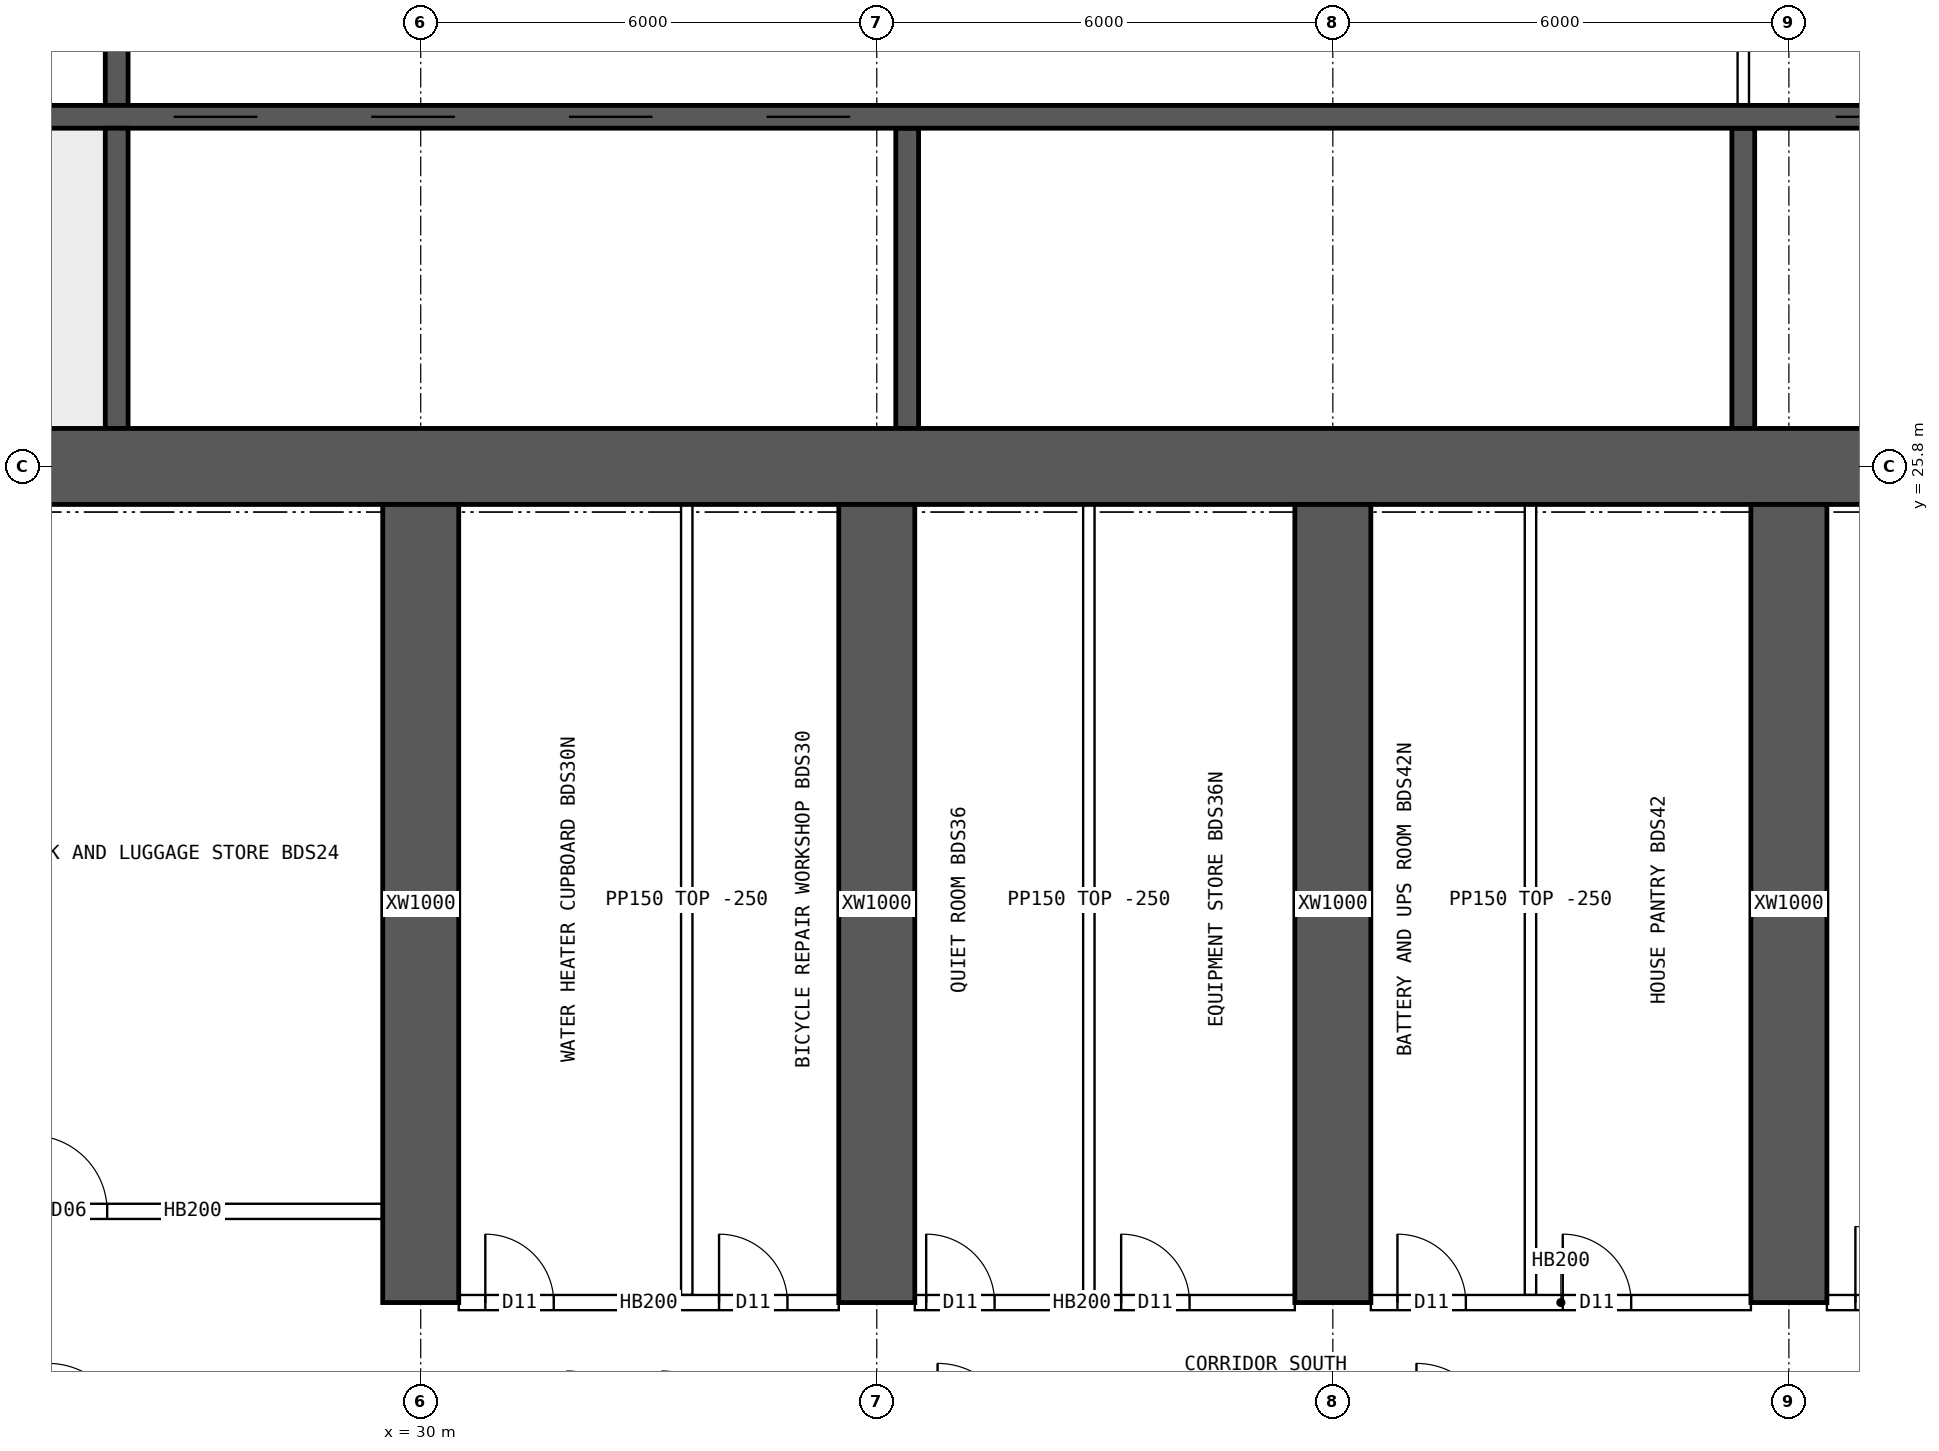
"""IFC4 building model, lengths in metres.
Left out: names, types, materials, properties, quantities, classifications, styles, units other than length and angle.
Written with IfcOpenShell. Run it as: python <this file> out.ifc"""

import sys

from ifc_helpers import new_model, si_unit, direction, frame, frame_2d, origin, place, context, subcontext, project, spatial, rectangle, extrude, element, fill, save


model = new_model("IFC4")
c1 = context("Model", 3, precision=1e-05, world=origin(), true_north=direction((0.0, 1.0)))
c2 = subcontext(c1, "Body", "Model", "MODEL_VIEW")
j1 = project(units=[si_unit("LENGTHUNIT", "METRE"), si_unit("PLANEANGLEUNIT", "RADIAN")], contexts=[c1])
p1 = place(None, origin())
s1 = spatial("IfcSite", under=j1, at=p1, CompositionType="ELEMENT")
p2 = place(p1, origin())
s2 = spatial("IfcBuilding", under=s1, at=p2, CompositionType="ELEMENT")
p3 = place(p2, frame((0.0, 0.0, 27.7)))
s3 = spatial("IfcBuildingStorey", under=s2, at=p3, CompositionType="ELEMENT", Elevation=27.7)
p4 = place(p3, frame((18.0, 25.8, 0.0), z_axis=(0.0, 0.0, 1.0), x_axis=(1.0, 0.0, 0.0)))
e1 = element("IfcWall", 1, at=p4, inside=s3, PredefinedType="SHEAR", context=c2, shape_type="SweptSolid", body=[
    extrude(rectangle(XDim=48.0, YDim=1.0, at=frame_2d((24.0, 0.0))), origin(), (0.0, 0.0, 1.0), 3.75),
])
p5 = place(p3, frame((18.5, 30.4, 0.0), z_axis=(0.0, 0.0, 1.0), x_axis=(1.0, 0.0, 0.0)))
e2 = element("IfcWall", 2, at=p5, inside=s3, PredefinedType="SHEAR", context=c2, shape_type="SweptSolid", body=[
    extrude(rectangle(XDim=47.0, YDim=0.3, at=frame_2d((23.5, 0.0))), origin(), (0.0, 0.0, 1.0), 3.75),
])
p6 = place(p5, frame((0.4, 0.0, 0.0)))
e3 = element("IfcOpeningElement", 3, at=p6, cuts=e2, PredefinedType="OPENING", context=c2, shape_type="SweptSolid", body=[
    extrude(rectangle(XDim=1.0, YDim=2.1, at=frame_2d((0.5, 1.05))), frame((0.0, 0.16, 0.0), z_axis=(0.0, -1.0, 0.0), x_axis=(1.0, 0.0, 0.0)), (0.0, 0.0, 1.0), 0.32),
])
p7 = place(p5, frame((45.6, 0.0, 0.0)))
e4 = element("IfcOpeningElement", 4, at=p7, cuts=e2, PredefinedType="OPENING", context=c2, shape_type="SweptSolid", body=[
    extrude(rectangle(XDim=1.0, YDim=2.1, at=frame_2d((0.5, 1.05))), frame((0.0, 0.16, 0.0), z_axis=(0.0, -1.0, 0.0), x_axis=(1.0, 0.0, 0.0)), (0.0, 0.0, 1.0), 0.32),
])
p8 = place(p5, frame((8.25, 0.0, 0.0)))
e5 = element("IfcOpeningElement", 5, at=p8, cuts=e2, PredefinedType="OPENING", context=c2, shape_type="SweptSolid", body=[
    extrude(rectangle(XDim=1.1, YDim=2.1, at=frame_2d((0.55, 1.05))), frame((0.0, 0.16, 0.0), z_axis=(0.0, -1.0, 0.0), x_axis=(1.0, 0.0, 0.0)), (0.0, 0.0, 1.0), 0.32),
])
p9 = place(p5, frame((10.85, 0.0, 0.0)))
e6 = element("IfcOpeningElement", 6, at=p9, cuts=e2, PredefinedType="OPENING", context=c2, shape_type="SweptSolid", body=[
    extrude(rectangle(XDim=1.1, YDim=2.1, at=frame_2d((0.55, 1.05))), frame((0.0, 0.16, 0.0), z_axis=(0.0, -1.0, 0.0), x_axis=(1.0, 0.0, 0.0)), (0.0, 0.0, 1.0), 0.32),
])
p10 = place(p5, frame((13.45, 0.0, 0.0)))
e7 = element("IfcOpeningElement", 7, at=p10, cuts=e2, PredefinedType="OPENING", context=c2, shape_type="SweptSolid", body=[
    extrude(rectangle(XDim=1.1, YDim=2.1, at=frame_2d((0.55, 1.05))), frame((0.0, 0.16, 0.0), z_axis=(0.0, -1.0, 0.0), x_axis=(1.0, 0.0, 0.0)), (0.0, 0.0, 1.0), 0.32),
])
p11 = place(p5, frame((16.05, 0.0, 0.0)))
e8 = element("IfcOpeningElement", 8, at=p11, cuts=e2, PredefinedType="OPENING", context=c2, shape_type="SweptSolid", body=[
    extrude(rectangle(XDim=1.1, YDim=2.1, at=frame_2d((0.55, 1.05))), frame((0.0, 0.16, 0.0), z_axis=(0.0, -1.0, 0.0), x_axis=(1.0, 0.0, 0.0)), (0.0, 0.0, 1.0), 0.32),
])
p12 = place(p5, frame((30.117, 0.0, 0.0)))
e9 = element("IfcOpeningElement", 9, at=p12, cuts=e2, PredefinedType="OPENING", context=c2, shape_type="SweptSolid", body=[
    extrude(rectangle(XDim=1.1, YDim=2.1, at=frame_2d((0.55, 1.05))), frame((0.0, 0.16, 0.0), z_axis=(0.0, -1.0, 0.0), x_axis=(1.0, 0.0, 0.0)), (0.0, 0.0, 1.0), 0.32),
])
p13 = place(p5, frame((33.65, 0.0, 0.0)))
e10 = element("IfcOpeningElement", 10, at=p13, cuts=e2, PredefinedType="OPENING", context=c2, shape_type="SweptSolid", body=[
    extrude(rectangle(XDim=1.1, YDim=2.1, at=frame_2d((0.55, 1.05))), frame((0.0, 0.16, 0.0), z_axis=(0.0, -1.0, 0.0), x_axis=(1.0, 0.0, 0.0)), (0.0, 0.0, 1.0), 0.32),
])
p14 = place(p5, frame((37.183, 0.0, 0.0)))
e11 = element("IfcOpeningElement", 11, at=p14, cuts=e2, PredefinedType="OPENING", context=c2, shape_type="SweptSolid", body=[
    extrude(rectangle(XDim=1.1, YDim=2.1, at=frame_2d((0.55, 1.05))), frame((0.0, 0.16, 0.0), z_axis=(0.0, -1.0, 0.0), x_axis=(1.0, 0.0, 0.0)), (0.0, 0.0, 1.0), 0.32),
])
p15 = place(p3, frame((26.0, 26.3, 0.0), z_axis=(0.0, 0.0, 1.0), x_axis=(0.0, 1.0, 0.0)))
e12 = element("IfcWall", 12, at=p15, inside=s3, PredefinedType="SHEAR", context=c2, shape_type="SweptSolid", body=[
    extrude(rectangle(XDim=3.95, YDim=0.3, at=frame_2d((1.975, 0.0))), origin(), (0.0, 0.0, 1.0), 3.75),
])
p16 = place(p3, frame((26.0, 30.55, 0.0), z_axis=(0.0, 0.0, 1.0), x_axis=(0.0, 1.0, 0.0)))
e13 = element("IfcWall", 13, at=p16, inside=s3, PredefinedType="SHEAR", context=c2, shape_type="SweptSolid", body=[
    extrude(rectangle(XDim=3.9, YDim=0.3, at=frame_2d((1.95, 0.0))), origin(), (0.0, 0.0, 1.0), 3.75),
])
p17 = place(p16, frame((1.4, 0.0, 0.0)))
e14 = element("IfcOpeningElement", 14, at=p17, cuts=e13, PredefinedType="OPENING", context=c2, shape_type="SweptSolid", body=[
    extrude(rectangle(XDim=1.2, YDim=2.1, at=frame_2d((0.6, 1.05))), frame((0.0, 0.16, 0.0), z_axis=(0.0, -1.0, 0.0), x_axis=(1.0, 0.0, 0.0)), (0.0, 0.0, 1.0), 0.32),
])
for number, where, z_axis, x_axis in (
    (15, (36.4, 26.3, 0.0), (0.0, 0.0, 1.0), (0.0, 1.0, 0.0)),
    (16, (47.4, 26.3, 0.0), (0.0, 0.0, 1.0), (0.0, 1.0, 0.0)),
):
    element("IfcWall", number, at=place(p3, frame(where, z_axis=z_axis, x_axis=x_axis)), inside=s3, PredefinedType="SHEAR", context=c2, shape_type="SweptSolid", body=[
        extrude(rectangle(XDim=3.95, YDim=0.3, at=frame_2d((1.975, 0.0))), origin(), (0.0, 0.0, 1.0), 3.75),
    ])
for number, where, z_axis, x_axis in (
    (17, (30.0, 14.8, 0.0), (0.0, 0.0, 1.0), (0.0, 1.0, 0.0)),
    (18, (36.0, 14.8, 0.0), (0.0, 0.0, 1.0), (0.0, 1.0, 0.0)),
    (19, (42.0, 14.8, 0.0), (0.0, 0.0, 1.0), (0.0, 1.0, 0.0)),
    (20, (48.0, 14.8, 0.0), (0.0, 0.0, 1.0), (0.0, 1.0, 0.0)),
):
    element("IfcWall", number, at=place(p3, frame(where, z_axis=z_axis, x_axis=x_axis)), inside=s3, PredefinedType="SHEAR", context=c2, shape_type="SweptSolid", body=[
        extrude(rectangle(XDim=10.5, YDim=1.0, at=frame_2d((5.25, 0.0))), origin(), (0.0, 0.0, 1.0), 3.75),
    ])
p18 = place(p3, frame((47.4, 30.55, 0.0), z_axis=(0.0, 0.0, 1.0), x_axis=(0.0, 1.0, 0.0)))
e21 = element("IfcWall", 21, at=p18, inside=s3, PredefinedType="SOLIDWALL", context=c2, shape_type="SweptSolid", body=[
    extrude(rectangle(XDim=3.9, YDim=0.15, at=frame_2d((1.95, 0.0))), origin(), (0.0, 0.0, 1.0), 3.5),
])
p19 = place(p18, frame((1.15, 0.0, 0.0)))
e22 = element("IfcOpeningElement", 22, at=p19, cuts=e21, PredefinedType="OPENING", context=c2, shape_type="SweptSolid", body=[
    extrude(rectangle(XDim=1.6, YDim=2.1, at=frame_2d((0.8, 1.05))), frame((0.0, 0.085, 0.0), z_axis=(0.0, -1.0, 0.0), x_axis=(1.0, 0.0, 0.0)), (0.0, 0.0, 1.0), 0.17),
])
p20 = place(p3, frame((30.5, 14.8, 0.0), z_axis=(0.0, 0.0, 1.0), x_axis=(1.0, 0.0, 0.0)))
e23 = element("IfcWall", 23, at=p20, inside=s3, PredefinedType="SOLIDWALL", context=c2, shape_type="SweptSolid", body=[
    extrude(rectangle(XDim=5.0, YDim=0.2, at=frame_2d((2.5, 0.0))), origin(), (0.0, 0.0, 1.0), 3.5),
])
p21 = place(p20, frame((0.35, 0.0, 0.0)))
e24 = element("IfcOpeningElement", 24, at=p21, cuts=e23, PredefinedType="OPENING", context=c2, shape_type="SweptSolid", body=[
    extrude(rectangle(XDim=0.9, YDim=2.1, at=frame_2d((0.45, 1.05))), frame((0.0, 0.11, 0.0), z_axis=(0.0, -1.0, 0.0), x_axis=(1.0, 0.0, 0.0)), (0.0, 0.0, 1.0), 0.22),
])
p22 = place(p20, frame((3.425, 0.0, 0.0)))
e25 = element("IfcOpeningElement", 25, at=p22, cuts=e23, PredefinedType="OPENING", context=c2, shape_type="SweptSolid", body=[
    extrude(rectangle(XDim=0.9, YDim=2.1, at=frame_2d((0.45, 1.05))), frame((0.0, 0.11, 0.0), z_axis=(0.0, -1.0, 0.0), x_axis=(1.0, 0.0, 0.0)), (0.0, 0.0, 1.0), 0.22),
])
p23 = place(p3, frame((36.5, 14.8, 0.0), z_axis=(0.0, 0.0, 1.0), x_axis=(1.0, 0.0, 0.0)))
e26 = element("IfcWall", 26, at=p23, inside=s3, PredefinedType="SOLIDWALL", context=c2, shape_type="SweptSolid", body=[
    extrude(rectangle(XDim=5.0, YDim=0.2, at=frame_2d((2.5, 0.0))), origin(), (0.0, 0.0, 1.0), 3.5),
])
p24 = place(p23, frame((0.15, 0.0, 0.0)))
e27 = element("IfcOpeningElement", 27, at=p24, cuts=e26, PredefinedType="OPENING", context=c2, shape_type="SweptSolid", body=[
    extrude(rectangle(XDim=0.9, YDim=2.1, at=frame_2d((0.45, 1.05))), frame((0.0, 0.11, 0.0), z_axis=(0.0, -1.0, 0.0), x_axis=(1.0, 0.0, 0.0)), (0.0, 0.0, 1.0), 0.22),
])
p25 = place(p23, frame((2.715, 0.0, 0.0)))
e28 = element("IfcOpeningElement", 28, at=p25, cuts=e26, PredefinedType="OPENING", context=c2, shape_type="SweptSolid", body=[
    extrude(rectangle(XDim=0.9, YDim=2.1, at=frame_2d((0.45, 1.05))), frame((0.0, 0.11, 0.0), z_axis=(0.0, -1.0, 0.0), x_axis=(1.0, 0.0, 0.0)), (0.0, 0.0, 1.0), 0.22),
])
p26 = place(p3, frame((42.5, 14.8, 0.0), z_axis=(0.0, 0.0, 1.0), x_axis=(1.0, 0.0, 0.0)))
e29 = element("IfcWall", 29, at=p26, inside=s3, PredefinedType="SOLIDWALL", context=c2, shape_type="SweptSolid", body=[
    extrude(rectangle(XDim=5.0, YDim=0.2, at=frame_2d((2.5, 0.0))), origin(), (0.0, 0.0, 1.0), 3.5),
])
p27 = place(p26, frame((0.35, 0.0, 0.0)))
e30 = element("IfcOpeningElement", 30, at=p27, cuts=e29, PredefinedType="OPENING", context=c2, shape_type="SweptSolid", body=[
    extrude(rectangle(XDim=0.9, YDim=2.1, at=frame_2d((0.45, 1.05))), frame((0.0, 0.11, 0.0), z_axis=(0.0, -1.0, 0.0), x_axis=(1.0, 0.0, 0.0)), (0.0, 0.0, 1.0), 0.22),
])
p28 = place(p26, frame((2.525, 0.0, 0.0)))
e31 = element("IfcOpeningElement", 31, at=p28, cuts=e29, PredefinedType="OPENING", context=c2, shape_type="SweptSolid", body=[
    extrude(rectangle(XDim=0.9, YDim=2.1, at=frame_2d((0.45, 1.05))), frame((0.0, 0.11, 0.0), z_axis=(0.0, -1.0, 0.0), x_axis=(1.0, 0.0, 0.0)), (0.0, 0.0, 1.0), 0.22),
])
p29 = place(p3, frame((48.5, 14.8, 0.0), z_axis=(0.0, 0.0, 1.0), x_axis=(1.0, 0.0, 0.0)))
e32 = element("IfcWall", 32, at=p29, inside=s3, PredefinedType="SOLIDWALL", context=c2, shape_type="SweptSolid", body=[
    extrude(rectangle(XDim=5.0, YDim=0.2, at=frame_2d((2.5, 0.0))), origin(), (0.0, 0.0, 1.0), 3.5),
])
p30 = place(p29, frame((0.375, 0.0, 0.0)))
e33 = element("IfcOpeningElement", 33, at=p30, cuts=e32, PredefinedType="OPENING", context=c2, shape_type="SweptSolid", body=[
    extrude(rectangle(XDim=1.0, YDim=2.1, at=frame_2d((0.5, 1.05))), frame((0.0, 0.11, 0.0), z_axis=(0.0, -1.0, 0.0), x_axis=(1.0, 0.0, 0.0)), (0.0, 0.0, 1.0), 0.22),
])
p31 = place(p3, frame((24.5, 16.0, 0.0), z_axis=(0.0, 0.0, 1.0), x_axis=(1.0, 0.0, 0.0)))
e34 = element("IfcWall", 34, at=p31, inside=s3, PredefinedType="SOLIDWALL", context=c2, shape_type="SweptSolid", body=[
    extrude(rectangle(XDim=5.0, YDim=0.2, at=frame_2d((2.5, 0.0))), origin(), (0.0, 0.0, 1.0), 3.5),
])
p32 = place(p31, frame((0.375, 0.0, 0.0)))
e35 = element("IfcOpeningElement", 35, at=p32, cuts=e34, PredefinedType="OPENING", context=c2, shape_type="SweptSolid", body=[
    extrude(rectangle(XDim=1.0, YDim=2.1, at=frame_2d((0.5, 1.05))), frame((0.0, 0.11, 0.0), z_axis=(0.0, -1.0, 0.0), x_axis=(1.0, 0.0, 0.0)), (0.0, 0.0, 1.0), 0.22),
])
for number, where, z_axis, x_axis in (
    (36, (33.5, 14.9, 0.0), (0.0, 0.0, 1.0), (0.0, 1.0, 0.0)),
    (37, (38.79, 14.9, 0.0), (0.0, 0.0, 1.0), (0.0, 1.0, 0.0)),
    (38, (44.6, 14.9, 0.0), (0.0, 0.0, 1.0), (0.0, 1.0, 0.0)),
):
    element("IfcWall", number, at=place(p3, frame(where, z_axis=z_axis, x_axis=x_axis)), inside=s3, PredefinedType="PARTITIONING", context=c2, shape_type="SweptSolid", body=[
        extrude(rectangle(XDim=10.4, YDim=0.15, at=frame_2d((5.2, 0.0))), origin(), (0.0, 0.0, 1.0), 3.5),
    ])
p33 = place(p8, origin())
e39 = element("IfcDoor", 39, at=p33, inside=s3, OperationType="DOUBLE_DOOR_SLIDING", PredefinedType="DOOR", context=c2, shape_type="SweptSolid", body=[
    extrude(rectangle(XDim=1.1, YDim=2.1, at=frame_2d((0.55, 1.05))), frame((0.0, 0.025, 0.0), z_axis=(0.0, -1.0, 0.0), x_axis=(1.0, 0.0, 0.0)), (0.0, 0.0, 1.0), 0.05),
])
fill(e5, e39)
p34 = place(p9, origin())
e40 = element("IfcDoor", 40, at=p34, inside=s3, OperationType="DOUBLE_DOOR_SLIDING", PredefinedType="DOOR", context=c2, shape_type="SweptSolid", body=[
    extrude(rectangle(XDim=1.1, YDim=2.1, at=frame_2d((0.55, 1.05))), frame((0.0, 0.025, 0.0), z_axis=(0.0, -1.0, 0.0), x_axis=(1.0, 0.0, 0.0)), (0.0, 0.0, 1.0), 0.05),
])
fill(e6, e40)
p35 = place(p10, origin())
e41 = element("IfcDoor", 41, at=p35, inside=s3, OperationType="DOUBLE_DOOR_SLIDING", PredefinedType="DOOR", context=c2, shape_type="SweptSolid", body=[
    extrude(rectangle(XDim=1.1, YDim=2.1, at=frame_2d((0.55, 1.05))), frame((0.0, 0.025, 0.0), z_axis=(0.0, -1.0, 0.0), x_axis=(1.0, 0.0, 0.0)), (0.0, 0.0, 1.0), 0.05),
])
fill(e7, e41)
p36 = place(p11, origin())
e42 = element("IfcDoor", 42, at=p36, inside=s3, OperationType="DOUBLE_DOOR_SLIDING", PredefinedType="DOOR", context=c2, shape_type="SweptSolid", body=[
    extrude(rectangle(XDim=1.1, YDim=2.1, at=frame_2d((0.55, 1.05))), frame((0.0, 0.025, 0.0), z_axis=(0.0, -1.0, 0.0), x_axis=(1.0, 0.0, 0.0)), (0.0, 0.0, 1.0), 0.05),
])
fill(e8, e42)
p37 = place(p12, origin())
e43 = element("IfcDoor", 43, at=p37, inside=s3, OperationType="DOUBLE_DOOR_SLIDING", PredefinedType="DOOR", context=c2, shape_type="SweptSolid", body=[
    extrude(rectangle(XDim=1.1, YDim=2.1, at=frame_2d((0.55, 1.05))), frame((0.0, 0.025, 0.0), z_axis=(0.0, -1.0, 0.0), x_axis=(1.0, 0.0, 0.0)), (0.0, 0.0, 1.0), 0.05),
])
fill(e9, e43)
p38 = place(p32, origin())
e44 = element("IfcDoor", 44, at=p38, inside=s3, OperationType="SINGLE_SWING_LEFT", PredefinedType="DOOR", context=c2, shape_type="SweptSolid", body=[
    extrude(rectangle(XDim=1.0, YDim=2.1, at=frame_2d((0.5, 1.05))), frame((0.0, 0.025, 0.0), z_axis=(0.0, -1.0, 0.0), x_axis=(1.0, 0.0, 0.0)), (0.0, 0.0, 1.0), 0.05),
])
fill(e35, e44)
p39 = place(p21, origin())
e45 = element("IfcDoor", 45, at=p39, inside=s3, OperationType="SINGLE_SWING_LEFT", PredefinedType="DOOR", context=c2, shape_type="SweptSolid", body=[
    extrude(rectangle(XDim=0.9, YDim=2.1, at=frame_2d((0.45, 1.05))), frame((0.0, 0.025, 0.0), z_axis=(0.0, -1.0, 0.0), x_axis=(1.0, 0.0, 0.0)), (0.0, 0.0, 1.0), 0.05),
])
fill(e24, e45)
p40 = place(p22, origin())
e46 = element("IfcDoor", 46, at=p40, inside=s3, OperationType="SINGLE_SWING_LEFT", PredefinedType="DOOR", context=c2, shape_type="SweptSolid", body=[
    extrude(rectangle(XDim=0.9, YDim=2.1, at=frame_2d((0.45, 1.05))), frame((0.0, 0.025, 0.0), z_axis=(0.0, -1.0, 0.0), x_axis=(1.0, 0.0, 0.0)), (0.0, 0.0, 1.0), 0.05),
])
fill(e25, e46)
p41 = place(p24, origin())
e47 = element("IfcDoor", 47, at=p41, inside=s3, OperationType="SINGLE_SWING_LEFT", PredefinedType="DOOR", context=c2, shape_type="SweptSolid", body=[
    extrude(rectangle(XDim=0.9, YDim=2.1, at=frame_2d((0.45, 1.05))), frame((0.0, 0.025, 0.0), z_axis=(0.0, -1.0, 0.0), x_axis=(1.0, 0.0, 0.0)), (0.0, 0.0, 1.0), 0.05),
])
fill(e27, e47)
p42 = place(p25, origin())
e48 = element("IfcDoor", 48, at=p42, inside=s3, OperationType="SINGLE_SWING_LEFT", PredefinedType="DOOR", context=c2, shape_type="SweptSolid", body=[
    extrude(rectangle(XDim=0.9, YDim=2.1, at=frame_2d((0.45, 1.05))), frame((0.0, 0.025, 0.0), z_axis=(0.0, -1.0, 0.0), x_axis=(1.0, 0.0, 0.0)), (0.0, 0.0, 1.0), 0.05),
])
fill(e28, e48)
p43 = place(p27, origin())
e49 = element("IfcDoor", 49, at=p43, inside=s3, OperationType="SINGLE_SWING_LEFT", PredefinedType="DOOR", context=c2, shape_type="SweptSolid", body=[
    extrude(rectangle(XDim=0.9, YDim=2.1, at=frame_2d((0.45, 1.05))), frame((0.0, 0.025, 0.0), z_axis=(0.0, -1.0, 0.0), x_axis=(1.0, 0.0, 0.0)), (0.0, 0.0, 1.0), 0.05),
])
fill(e30, e49)
p44 = place(p28, origin())
e50 = element("IfcDoor", 50, at=p44, inside=s3, OperationType="SINGLE_SWING_LEFT", PredefinedType="DOOR", context=c2, shape_type="SweptSolid", body=[
    extrude(rectangle(XDim=0.9, YDim=2.1, at=frame_2d((0.45, 1.05))), frame((0.0, 0.025, 0.0), z_axis=(0.0, -1.0, 0.0), x_axis=(1.0, 0.0, 0.0)), (0.0, 0.0, 1.0), 0.05),
])
fill(e31, e50)
p45 = place(p30, origin())
e51 = element("IfcDoor", 51, at=p45, inside=s3, OperationType="SINGLE_SWING_LEFT", PredefinedType="DOOR", context=c2, shape_type="SweptSolid", body=[
    extrude(rectangle(XDim=1.0, YDim=2.1, at=frame_2d((0.5, 1.05))), frame((0.0, 0.025, 0.0), z_axis=(0.0, -1.0, 0.0), x_axis=(1.0, 0.0, 0.0)), (0.0, 0.0, 1.0), 0.05),
])
fill(e33, e51)
save(model, sys.argv[1])
